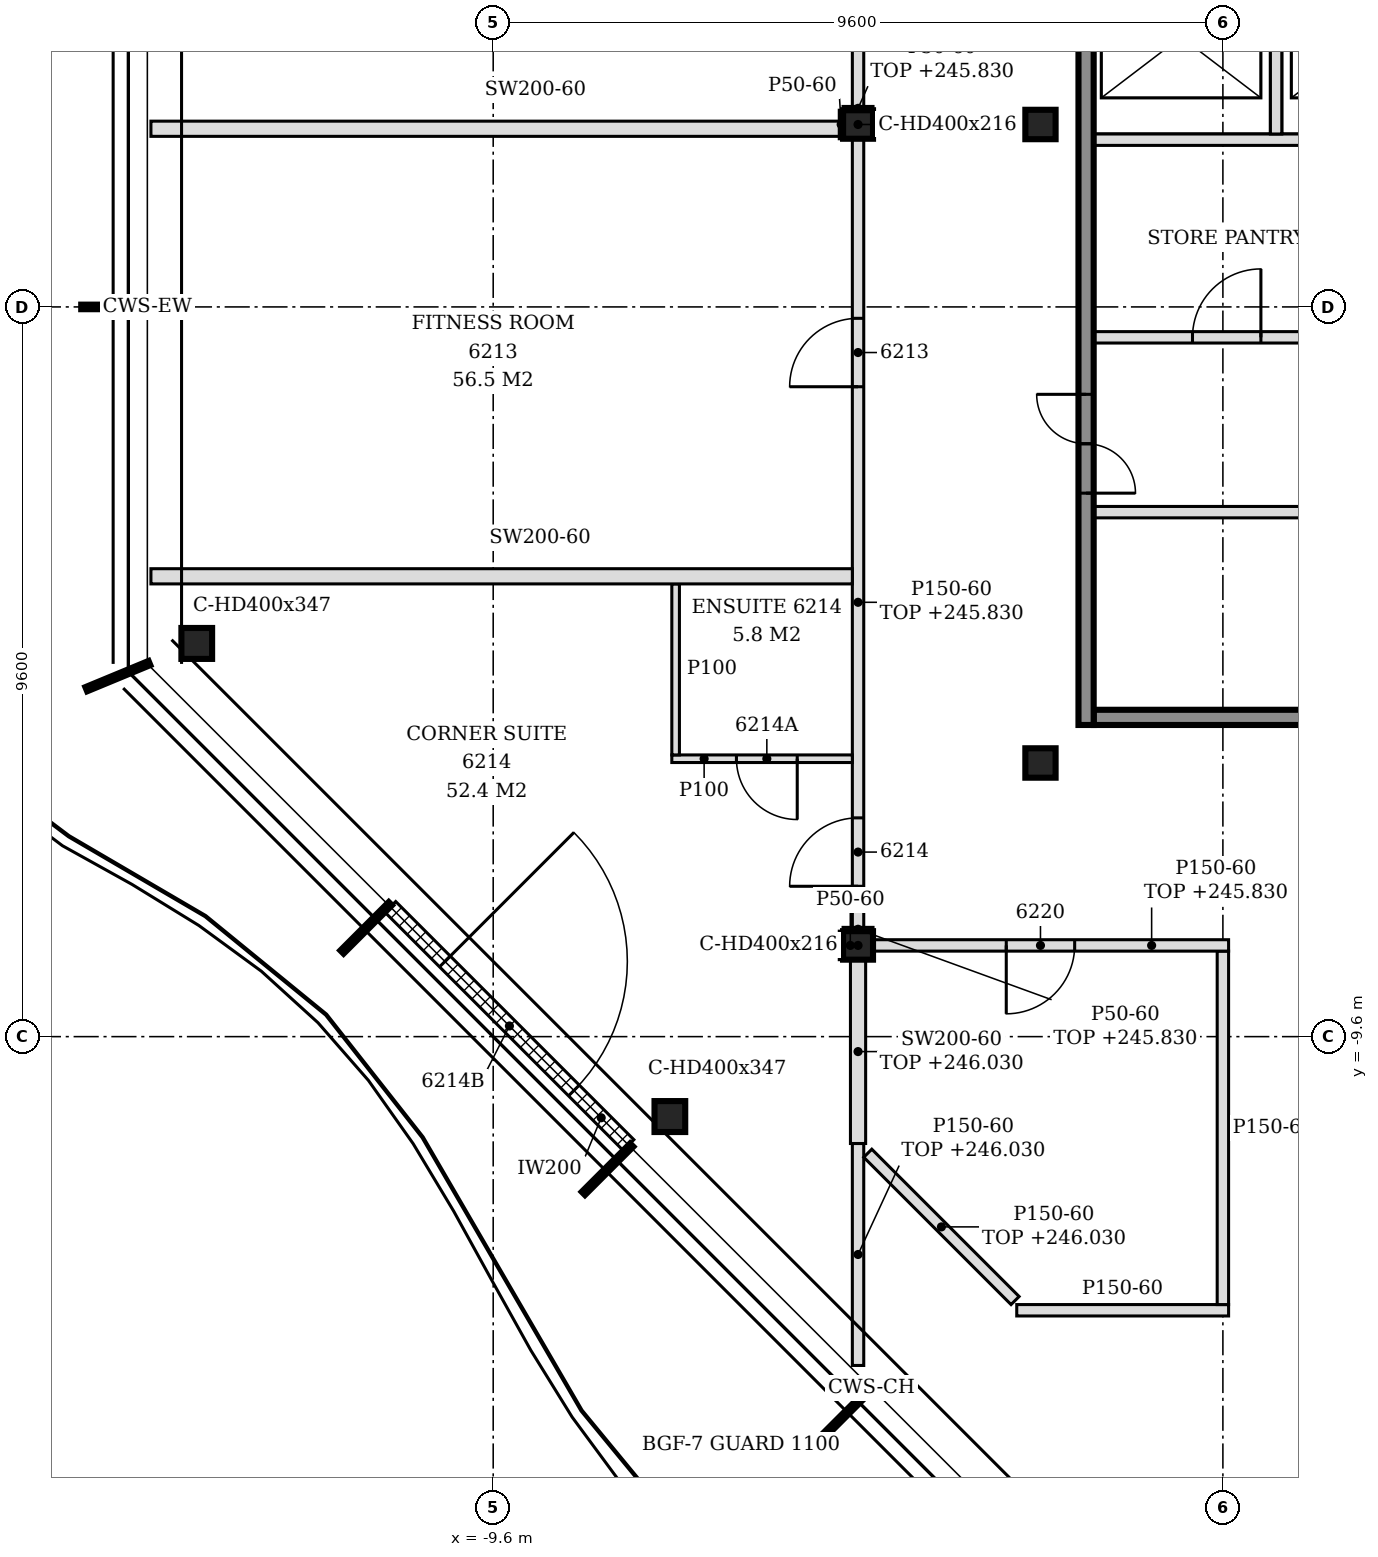
"""IFC4 building model, lengths in metres.
Left out: names, types, materials, properties, quantities, classifications, styles, units other than length and angle.
Written with IfcOpenShell. Run it as: python <this file> out.ifc"""

import sys

from ifc_helpers import new_model, si_unit, direction, frame, frame_2d, origin, origin_2d, place, context, subcontext, project, spatial, polyline, rectangle, i_section, outline, extrude, element, fill, save


model = new_model("IFC4")
c1 = context("Model", 3, precision=1e-05, world=origin(), true_north=direction((0.0, 1.0)))
c2 = subcontext(c1, "Body", "Model", "MODEL_VIEW")
j1 = project(units=[si_unit("LENGTHUNIT", "METRE"), si_unit("PLANEANGLEUNIT", "RADIAN")], contexts=[c1])
p1 = place(None, origin())
s1 = spatial("IfcSite", under=j1, at=p1, CompositionType="ELEMENT")
p2 = place(p1, origin())
s2 = spatial("IfcBuilding", under=s1, at=p2, CompositionType="ELEMENT")
p3 = place(p2, frame((0.0, 0.0, 243.0)))
s3 = spatial("IfcBuildingStorey", under=s2, at=p3, CompositionType="ELEMENT", Elevation=243.0)
for number, where, z_axis, x_axis in (
    (1, (-13.5, -4.427, -0.15), (0.0, 0.0, 1.0), (1.0, 0.0, 0.0)),
    (2, (-7.276, -10.652, -0.15), (0.0, 0.0, 1.0), (1.0, 0.0, 0.0)),
):
    element("IfcColumn", number, at=place(p3, frame(where, z_axis=z_axis, x_axis=x_axis)), inside=s3, PredefinedType="COLUMN", context=c2, shape_type="SweptSolid", body=[
        extrude(i_section(OverallWidth=0.404, OverallDepth=0.407, WebThickness=0.027, FlangeThickness=0.044, FilletRadius=0.015, at=origin_2d()), origin(), (0.0, 0.0, 1.0), 3.6),
    ])
for number, where, z_axis, x_axis in (
    (3, (-4.8, -8.4, -0.15), (0.0, 0.0, 1.0), (1.0, 0.0, 0.0)),
    (4, (-4.8, 2.4, -0.15), (0.0, 0.0, 1.0), (1.0, 0.0, 0.0)),
):
    element("IfcColumn", number, at=place(p3, frame(where, z_axis=z_axis, x_axis=x_axis)), inside=s3, PredefinedType="COLUMN", context=c2, shape_type="SweptSolid", body=[
        extrude(i_section(OverallWidth=0.394, OverallDepth=0.375, WebThickness=0.017, FlangeThickness=0.028, FilletRadius=0.015, at=origin_2d()), origin(), (0.0, 0.0, 1.0), 3.6),
    ])
for number, where, z_axis, x_axis in (
    (5, (-2.4, -6.0, -0.15), (0.0, 0.0, 1.0), (1.0, 0.0, 0.0)),
    (6, (-2.4, 2.4, -0.15), (0.0, 0.0, 1.0), (1.0, 0.0, 0.0)),
):
    element("IfcColumn", number, at=place(p3, frame(where, z_axis=z_axis, x_axis=x_axis)), inside=s3, PredefinedType="COLUMN", context=c2, shape_type="SweptSolid", body=[
        extrude(i_section(OverallWidth=0.398, OverallDepth=0.387, WebThickness=0.021, FlangeThickness=0.033, FilletRadius=0.015, at=origin_2d()), origin(), (0.0, 0.0, 1.0), 3.6),
    ])
p4 = place(p3, frame((-10.953, -7.893, 0.0), z_axis=(0.0, 0.0, 1.0), x_axis=(0.707106781187, -0.707106781187, 0.0)))
e7 = element("IfcWall", 7, at=p4, inside=s3, PredefinedType="NOTDEFINED", context=c2, shape_type="SweptSolid", body=[
    extrude(rectangle(XDim=4.431, YDim=0.2, at=frame_2d((2.215, 0.0))), origin(), (0.0, 0.0, 1.0), 3.45),
])
p5 = place(p4, frame((1.015, 0.0, 0.0)))
e8 = element("IfcOpeningElement", 8, at=p5, cuts=e7, PredefinedType="OPENING", context=c2, shape_type="SweptSolid", body=[
    extrude(rectangle(XDim=2.4, YDim=2.4, at=frame_2d((1.2, 1.2))), frame((0.0, 0.11, 0.0), z_axis=(0.0, -1.0, 0.0), x_axis=(1.0, 0.0, 0.0)), (0.0, 0.0, 1.0), 0.22),
])
p6 = place(p3, frame((-1.7, -5.4, 0.0), z_axis=(0.0, 0.0, 1.0), x_axis=(1.0, 0.0, 0.0)))
e9 = element("IfcWall", 9, at=p6, inside=s3, PredefinedType="SOLIDWALL", context=c2, shape_type="SweptSolid", body=[
    extrude(rectangle(XDim=7.9, YDim=0.2, at=frame_2d((3.95, 0.0))), origin(), (0.0, 0.0, 1.0), 3.45),
])
p7 = place(p3, frame((-1.7, -2.7, 0.0), z_axis=(0.0, 0.0, 1.0), x_axis=(1.0, 0.0, 0.0)))
e10 = element("IfcWall", 10, at=p7, inside=s3, PredefinedType="PARTITIONING", context=c2, shape_type="SweptSolid", body=[
    extrude(rectangle(XDim=7.825, YDim=0.15, at=frame_2d((3.913, 0.0))), origin(), (0.0, 0.0, 1.0), 3.45),
])
p8 = place(p7, frame((3.45, 0.0, 0.0)))
e11 = element("IfcOpeningElement", 11, at=p8, cuts=e10, PredefinedType="OPENING", context=c2, shape_type="SweptSolid", body=[
    extrude(rectangle(XDim=0.9, YDim=2.1, at=frame_2d((0.45, 1.05))), frame((0.0, 0.085, 0.0), z_axis=(0.0, -1.0, 0.0), x_axis=(1.0, 0.0, 0.0)), (0.0, 0.0, 1.0), 0.17),
])
p9 = place(p3, frame((-1.7, -0.4, 0.0), z_axis=(0.0, 0.0, 1.0), x_axis=(1.0, 0.0, 0.0)))
e12 = element("IfcWall", 12, at=p9, inside=s3, PredefinedType="PARTITIONING", context=c2, shape_type="SweptSolid", body=[
    extrude(rectangle(XDim=10.825, YDim=0.15, at=frame_2d((5.413, 0.0))), origin(), (0.0, 0.0, 1.0), 3.45),
])
p10 = place(p9, frame((1.3, 0.0, 0.0)))
e13 = element("IfcOpeningElement", 13, at=p10, cuts=e12, PredefinedType="OPENING", context=c2, shape_type="SweptSolid", body=[
    extrude(rectangle(XDim=0.9, YDim=2.1, at=frame_2d((0.45, 1.05))), frame((0.0, 0.085, 0.0), z_axis=(0.0, -1.0, 0.0), x_axis=(1.0, 0.0, 0.0)), (0.0, 0.0, 1.0), 0.17),
])
p11 = place(p9, frame((6.8, 0.0, 0.0)))
e14 = element("IfcOpeningElement", 14, at=p11, cuts=e12, PredefinedType="OPENING", context=c2, shape_type="SweptSolid", body=[
    extrude(rectangle(XDim=0.9, YDim=2.1, at=frame_2d((0.45, 1.05))), frame((0.0, 0.085, 0.0), z_axis=(0.0, -1.0, 0.0), x_axis=(1.0, 0.0, 0.0)), (0.0, 0.0, 1.0), 0.17),
])
p12 = place(p3, frame((-1.7, 2.2, 0.0), z_axis=(0.0, 0.0, 1.0), x_axis=(1.0, 0.0, 0.0)))
e15 = element("IfcWall", 15, at=p12, inside=s3, PredefinedType="SOLIDWALL", context=c2, shape_type="SweptSolid", body=[
    extrude(rectangle(XDim=4.9, YDim=0.15, at=frame_2d((2.45, 0.0))), origin(), (0.0, 0.0, 1.0), 3.45),
])
p13 = place(p3, frame((-1.8, -5.5, 0.0), z_axis=(0.0, 0.0, 1.0), x_axis=(0.0, 1.0, 0.0)))
e16 = element("IfcWall", 16, at=p13, inside=s3, PredefinedType="SOLIDWALL", context=c2, shape_type="SweptSolid", body=[
    extrude(rectangle(XDim=15.8, YDim=0.2, at=frame_2d((7.9, 0.0))), origin(), (0.0, 0.0, 1.0), 3.45),
])
p14 = place(p13, frame((3.05, 0.0, 0.0)))
e17 = element("IfcOpeningElement", 17, at=p14, cuts=e16, PredefinedType="OPENING", context=c2, shape_type="SweptSolid", body=[
    extrude(rectangle(XDim=1.3, YDim=2.1, at=frame_2d((0.65, 1.05))), frame((0.0, 0.11, 0.0), z_axis=(0.0, -1.0, 0.0), x_axis=(1.0, 0.0, 0.0)), (0.0, 0.0, 1.0), 0.22),
])
p15 = place(p13, frame((11.45, 0.0, 0.0)))
e18 = element("IfcOpeningElement", 18, at=p15, cuts=e16, PredefinedType="OPENING", context=c2, shape_type="SweptSolid", body=[
    extrude(rectangle(XDim=1.3, YDim=2.1, at=frame_2d((0.65, 1.05))), frame((0.0, 0.11, 0.0), z_axis=(0.0, -1.0, 0.0), x_axis=(1.0, 0.0, 0.0)), (0.0, 0.0, 1.0), 0.22),
])
p16 = place(p3, frame((0.7, 2.275, 0.0), z_axis=(0.0, 0.0, 1.0), x_axis=(0.0, 1.0, 0.0)))
e19 = element("IfcWall", 19, at=p16, inside=s3, PredefinedType="SOLIDWALL", context=c2, shape_type="SweptSolid", body=[
    extrude(rectangle(XDim=2.55, YDim=0.15, at=frame_2d((1.275, 0.0))), origin(), (0.0, 0.0, 1.0), 3.45),
])
p17 = place(p3, frame((-4.8, -13.926, 0.0), z_axis=(0.0, 0.0, 1.0), x_axis=(0.0, 1.0, 0.0)))
e20 = element("IfcWall", 20, at=p17, inside=s3, PredefinedType="PARTITIONING", context=c2, shape_type="SweptSolid", body=[
    extrude(outline(polyline([(0.0, 0.0), (2.92, 0.0), (2.92, 3.03), (1.369, 3.03), (1.367, 2.63), (0.229, 2.63), (0.227, 3.03), (0.0, 3.03), (0.0, 0.0)])), frame((0.0, 0.075, 0.0), z_axis=(0.0, -1.0, 0.0), x_axis=(1.0, 0.0, 0.0)), (0.0, 0.0, 1.0), 0.15),
])
p18 = place(p3, frame((-2.712, -13.2, 0.0), z_axis=(0.0, 0.0, 1.0), x_axis=(1.0, 0.0, 0.0)))
e21 = element("IfcWall", 21, at=p18, inside=s3, PredefinedType="PARTITIONING", context=c2, shape_type="SweptSolid", body=[
    extrude(rectangle(XDim=2.787, YDim=0.15, at=frame_2d((1.394, 0.0))), origin(), (0.0, 0.0, 1.0), 3.45),
])
p19 = place(p3, frame((-2.734, -13.072, 0.0), z_axis=(0.0, 0.0, 1.0), x_axis=(-0.707151316332, 0.707062243236, 0.0)))
e22 = element("IfcWall", 22, at=p19, inside=s3, PredefinedType="PARTITIONING", context=c2, shape_type="SweptSolid", body=[
    extrude(rectangle(XDim=2.741, YDim=0.15, at=frame_2d((1.371, 0.0))), origin(), (0.0, 0.0, 1.0), 3.03),
])
p20 = place(p3, frame((0.0, -13.125, 0.0), z_axis=(0.0, 0.0, 1.0), x_axis=(0.0, 1.0, 0.0)))
e23 = element("IfcWall", 23, at=p20, inside=s3, PredefinedType="PARTITIONING", context=c2, shape_type="SweptSolid", body=[
    extrude(outline(polyline([(0.0, 0.0), (4.65, 0.0), (4.65, 2.83), (4.575, 2.83), (4.573, 3.45), (0.0, 3.45), (0.0, 0.0)])), frame((0.0, 0.075, 0.0), z_axis=(0.0, -1.0, 0.0), x_axis=(1.0, 0.0, 0.0)), (0.0, 0.0, 1.0), 0.15),
])
p21 = place(p3, frame((-4.8, -11.006, 0.0), z_axis=(0.0, 0.0, 1.0), x_axis=(0.0, 1.0, 0.0)))
e24 = element("IfcWall", 24, at=p21, inside=s3, PredefinedType="PARTITIONING", context=c2, shape_type="SweptSolid", body=[
    extrude(rectangle(XDim=2.419, YDim=0.2, at=frame_2d((1.209, 0.0))), origin(), (0.0, 0.0, 1.0), 3.03),
])
p22 = place(p3, frame((-4.603, -8.4, 0.0), z_axis=(0.0, 0.0, 1.0), x_axis=(1.0, 0.0, 0.0)))
e25 = element("IfcWall", 25, at=p22, inside=s3, PredefinedType="PARTITIONING", context=c2, shape_type="SweptSolid", body=[
    extrude(rectangle(XDim=4.678, YDim=0.15, at=frame_2d((2.339, 0.0))), origin(), (0.0, 0.0, 1.0), 2.83),
])
p23 = place(p22, frame((1.753, 0.0, 0.0)))
e26 = element("IfcOpeningElement", 26, at=p23, cuts=e25, PredefinedType="OPENING", context=c2, shape_type="SweptSolid", body=[
    extrude(rectangle(XDim=0.9, YDim=2.1, at=frame_2d((0.45, 1.05))), frame((0.0, 0.085, 0.0), z_axis=(0.0, -1.0, 0.0), x_axis=(1.0, 0.0, 0.0)), (0.0, 0.0, 1.0), 0.17),
])
p24 = place(p3, frame((-4.8, -8.212, 0.0), z_axis=(0.0, 0.0, 1.0), x_axis=(0.0, 1.0, 0.0)))
e27 = element("IfcWall", 27, at=p24, inside=s3, PredefinedType="PARTITIONING", context=c2, shape_type="SweptSolid", body=[
    extrude(rectangle(XDim=10.425, YDim=0.15, at=frame_2d((5.212, 0.0))), origin(), (0.0, 0.0, 1.0), 2.83),
])
p25 = place(p24, frame((7.163, 0.0, 0.0)))
e28 = element("IfcOpeningElement", 28, at=p25, cuts=e27, PredefinedType="OPENING", context=c2, shape_type="SweptSolid", body=[
    extrude(rectangle(XDim=0.9, YDim=2.1, at=frame_2d((0.45, 1.05))), frame((0.0, 0.085, 0.0), z_axis=(0.0, -1.0, 0.0), x_axis=(1.0, 0.0, 0.0)), (0.0, 0.0, 1.0), 0.17),
])
p26 = place(p24, frame((0.591, 0.0, 0.0)))
e29 = element("IfcOpeningElement", 29, at=p26, cuts=e27, PredefinedType="OPENING", context=c2, shape_type="SweptSolid", body=[
    extrude(rectangle(XDim=0.9, YDim=2.1, at=frame_2d((0.45, 1.05))), frame((0.0, 0.085, 0.0), z_axis=(0.0, -1.0, 0.0), x_axis=(1.0, 0.0, 0.0)), (0.0, 0.0, 1.0), 0.17),
])
p27 = place(p3, frame((-7.25, -5.944, 0.0), z_axis=(0.0, 0.0, 1.0), x_axis=(1.0, 0.0, 0.0)))
e30 = element("IfcWall", 30, at=p27, inside=s3, PredefinedType="PARTITIONING", context=c2, shape_type="SweptSolid", body=[
    extrude(outline(polyline([(0.0, 0.0), (2.375, 0.0), (2.375, 2.83), (2.3, 2.83), (2.298, 3.45), (0.0, 3.45), (0.0, 0.0)])), frame((0.0, 0.05, 0.0), z_axis=(0.0, -1.0, 0.0), x_axis=(1.0, 0.0, 0.0)), (0.0, 0.0, 1.0), 0.1),
])
p28 = place(p27, frame((0.85, 0.0, 0.0)))
e31 = element("IfcOpeningElement", 31, at=p28, cuts=e30, PredefinedType="OPENING", context=c2, shape_type="SweptSolid", body=[
    extrude(rectangle(XDim=0.8, YDim=2.1, at=frame_2d((0.4, 1.05))), frame((0.0, 0.06, 0.0), z_axis=(0.0, -1.0, 0.0), x_axis=(1.0, 0.0, 0.0)), (0.0, 0.0, 1.0), 0.12),
])
p29 = place(p3, frame((-7.2, -5.894, 0.0), z_axis=(0.0, 0.0, 1.0), x_axis=(0.0, 1.0, 0.0)))
e32 = element("IfcWall", 32, at=p29, inside=s3, PredefinedType="PARTITIONING", context=c2, shape_type="SweptSolid", body=[
    extrude(outline(polyline([(0.0, 0.0), (2.25, 0.0), (2.25, 3.45), (1.189, 3.45), (1.187, 2.98), (0.999, 2.98), (0.997, 3.45), (0.0, 3.45), (0.0, 0.0)])), frame((0.0, 0.05, 0.0), z_axis=(0.0, -1.0, 0.0), x_axis=(1.0, 0.0, 0.0)), (0.0, 0.0, 1.0), 0.1),
])
p30 = place(p3, frame((-14.103, -3.544, 0.0), z_axis=(0.0, 0.0, 1.0), x_axis=(1.0, 0.0, 0.0)))
e33 = element("IfcWall", 33, at=p30, inside=s3, PredefinedType="PARTITIONING", context=c2, shape_type="SweptSolid", body=[
    extrude(outline(polyline([(0.0, 0.0), (9.228, 0.0), (9.228, 2.83), (9.153, 2.83), (9.151, 3.45), (0.753, 3.45), (0.751, 2.93), (0.453, 2.93), (0.451, 3.45), (0.0, 3.45), (0.0, 0.0)])), frame((0.0, 0.1, 0.0), z_axis=(0.0, -1.0, 0.0), x_axis=(1.0, 0.0, 0.0)), (0.0, 0.0, 1.0), 0.2),
])
p31 = place(p3, frame((-14.103, 2.344, 0.0), z_axis=(0.0, 0.0, 1.0), x_axis=(1.0, 0.0, 0.0)))
e34 = element("IfcWall", 34, at=p31, inside=s3, PredefinedType="PARTITIONING", context=c2, shape_type="SweptSolid", body=[
    extrude(outline(polyline([(0.0, 0.0), (9.106, 0.0), (9.106, 3.45), (0.753, 3.45), (0.751, 2.93), (0.453, 2.93), (0.451, 3.45), (0.0, 3.45), (0.0, 0.0)])), frame((0.0, 0.1, 0.0), z_axis=(0.0, -1.0, 0.0), x_axis=(1.0, 0.0, 0.0)), (0.0, 0.0, 1.0), 0.2),
])
p32 = place(p3, frame((-4.8, 2.587, 0.0), z_axis=(0.0, 0.0, 1.0), x_axis=(0.0, 1.0, 0.0)))
e35 = element("IfcWall", 35, at=p32, inside=s3, PredefinedType="PARTITIONING", context=c2, shape_type="SweptSolid", body=[
    extrude(outline(polyline([(0.0, 0.0), (10.425, 0.0), (10.425, 2.63), (9.97, 2.63), (9.968, 2.83), (0.0, 2.83), (0.0, 0.0)])), frame((0.0, 0.075, 0.0), z_axis=(0.0, -1.0, 0.0), x_axis=(1.0, 0.0, 0.0)), (0.0, 0.0, 1.0), 0.15),
])
for number, where, z_axis, x_axis in (
    (36, (-5.022, -8.587, 0.0), (0.0, 0.0, 1.0), (0.0, 1.0, 0.0)),
    (37, (-5.022, 2.212, 0.0), (0.0, 0.0, 1.0), (0.0, 1.0, 0.0)),
):
    element("IfcWall", number, at=place(p3, frame(where, z_axis=z_axis, x_axis=x_axis)), inside=s3, PredefinedType="PARTITIONING", context=c2, shape_type="SweptSolid", body=[
        extrude(rectangle(XDim=0.375, YDim=0.05, at=frame_2d((0.188, 0.0))), origin(), (0.0, 0.0, 1.0), 3.45),
    ])
for number, where, z_axis, x_axis in (
    (38, (-4.997, -8.188, 0.0), (0.0, 0.0, 1.0), (1.0, 0.0, 0.0)),
    (39, (-4.997, 2.613, 0.0), (0.0, 0.0, 1.0), (1.0, 0.0, 0.0)),
):
    element("IfcWall", number, at=place(p3, frame(where, z_axis=z_axis, x_axis=x_axis)), inside=s3, PredefinedType="PARTITIONING", context=c2, shape_type="SweptSolid", body=[
        extrude(rectangle(XDim=0.394, YDim=0.05, at=frame_2d((0.197, 0.0))), origin(), (0.0, 0.0, 1.0), 2.83),
    ])
p33 = place(p5, origin())
e40 = element("IfcDoor", 40, at=p33, inside=s3, OperationType="SINGLE_SWING_LEFT", PredefinedType="DOOR", context=c2, shape_type="SweptSolid", body=[
    extrude(rectangle(XDim=2.4, YDim=2.4, at=frame_2d((1.2, 1.2))), frame((0.0, 0.025, 0.0), z_axis=(0.0, -1.0, 0.0), x_axis=(1.0, 0.0, 0.0)), (0.0, 0.0, 1.0), 0.05),
])
fill(e8, e40)
p34 = place(p14, origin())
e41 = element("IfcDoor", 41, at=p34, inside=s3, OperationType="DOUBLE_DOOR_SINGLE_SWING", PredefinedType="DOOR", context=c2, shape_type="SweptSolid", body=[
    extrude(rectangle(XDim=1.3, YDim=2.1, at=frame_2d((0.65, 1.05))), frame((0.0, 0.025, 0.0), z_axis=(0.0, -1.0, 0.0), x_axis=(1.0, 0.0, 0.0)), (0.0, 0.0, 1.0), 0.05),
])
fill(e17, e41)
p35 = place(p10, origin())
e42 = element("IfcDoor", 42, at=p35, inside=s3, OperationType="SINGLE_SWING_RIGHT", PredefinedType="DOOR", context=c2, shape_type="SweptSolid", body=[
    extrude(rectangle(XDim=0.9, YDim=2.1, at=frame_2d((0.45, 1.05))), frame((0.0, 0.025, 0.0), z_axis=(0.0, -1.0, 0.0), x_axis=(1.0, 0.0, 0.0)), (0.0, 0.0, 1.0), 0.05),
])
fill(e13, e42)
p36 = place(p25, origin())
e43 = element("IfcDoor", 43, at=p36, inside=s3, OperationType="SINGLE_SWING_LEFT", PredefinedType="DOOR", context=c2, shape_type="SweptSolid", body=[
    extrude(rectangle(XDim=0.9, YDim=2.1, at=frame_2d((0.45, 1.05))), frame((0.0, 0.025, 0.0), z_axis=(0.0, -1.0, 0.0), x_axis=(1.0, 0.0, 0.0)), (0.0, 0.0, 1.0), 0.05),
])
fill(e28, e43)
p37 = place(p26, origin())
e44 = element("IfcDoor", 44, at=p37, inside=s3, OperationType="SINGLE_SWING_LEFT", PredefinedType="DOOR", context=c2, shape_type="SweptSolid", body=[
    extrude(rectangle(XDim=0.9, YDim=2.1, at=frame_2d((0.45, 1.05))), frame((0.0, 0.025, 0.0), z_axis=(0.0, -1.0, 0.0), x_axis=(1.0, 0.0, 0.0)), (0.0, 0.0, 1.0), 0.05),
])
fill(e29, e44)
p38 = place(p28, frame((0.8, 0.0, 0.0), z_axis=(0.0, 0.0, 1.0), x_axis=(-1.0, 0.0, 0.0)))
e45 = element("IfcDoor", 45, at=p38, inside=s3, OperationType="SINGLE_SWING_LEFT", PredefinedType="DOOR", context=c2, shape_type="SweptSolid", body=[
    extrude(rectangle(XDim=0.8, YDim=2.1, at=frame_2d((0.4, 1.05))), frame((0.0, 0.025, 0.0), z_axis=(0.0, -1.0, 0.0), x_axis=(1.0, 0.0, 0.0)), (0.0, 0.0, 1.0), 0.05),
])
fill(e31, e45)
p39 = place(p23, frame((0.9, 0.0, 0.0), z_axis=(0.0, 0.0, 1.0), x_axis=(-1.0, 0.0, 0.0)))
e46 = element("IfcDoor", 46, at=p39, inside=s3, OperationType="SINGLE_SWING_RIGHT", PredefinedType="DOOR", context=c2, shape_type="SweptSolid", body=[
    extrude(rectangle(XDim=0.9, YDim=2.1, at=frame_2d((0.45, 1.05))), frame((0.0, 0.025, 0.0), z_axis=(0.0, -1.0, 0.0), x_axis=(1.0, 0.0, 0.0)), (0.0, 0.0, 1.0), 0.05),
])
fill(e26, e46)
save(model, sys.argv[1])
